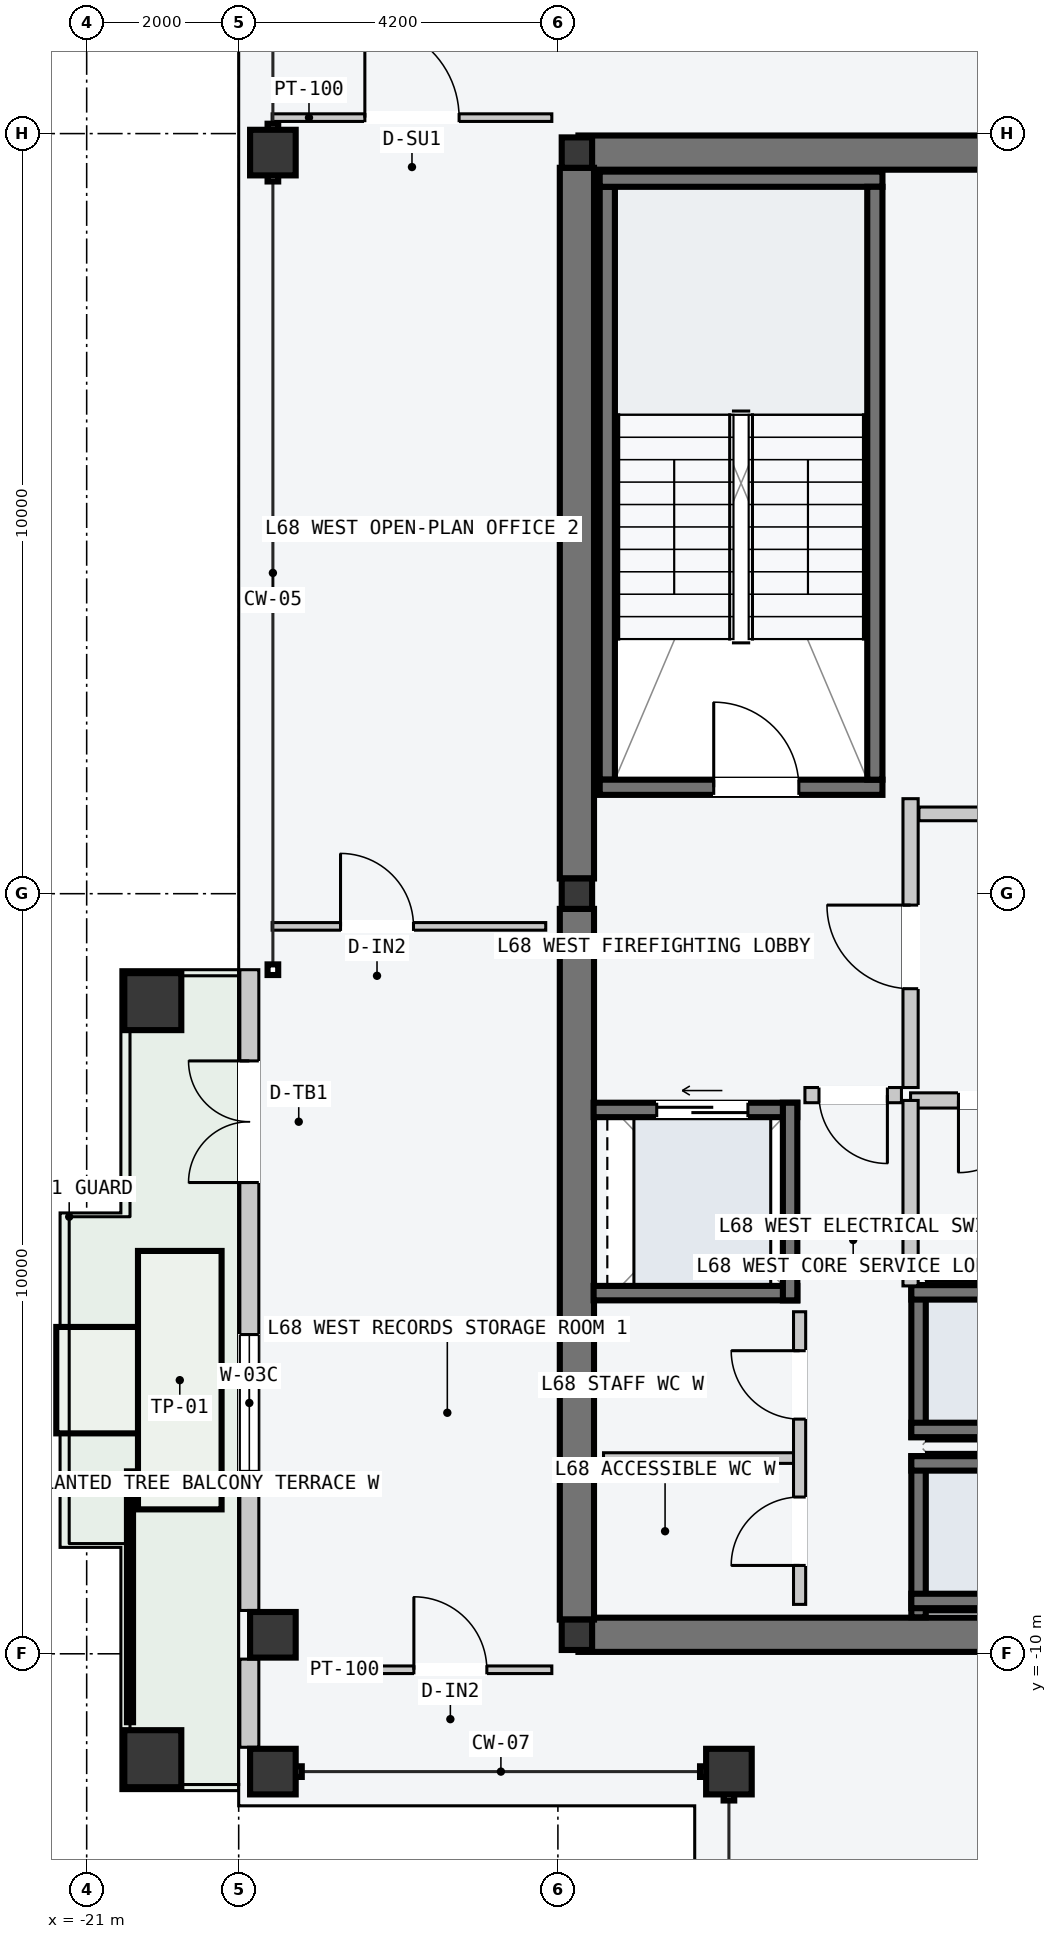
"""IFC4 building model, lengths in metres.
Left out: names, types, materials, properties, quantities, classifications, styles, units other than length and angle.
Written with IfcOpenShell. Run it as: python <this file> out.ifc"""

import sys

from ifc_helpers import new_model, si_unit, direction, frame, frame_2d, origin, origin_2d, place, context, subcontext, project, spatial, rectangle, hollow_rectangle, i_section, extrude, element, fill, save


model = new_model("IFC4")
c1 = context("Model", 3, precision=1e-05, world=origin(), true_north=direction((0.0, 1.0)))
c2 = subcontext(c1, "Body", "Model", "MODEL_VIEW")
j1 = project(units=[si_unit("LENGTHUNIT", "METRE"), si_unit("PLANEANGLEUNIT", "RADIAN")], contexts=[c1])
p1 = place(None, origin())
s1 = spatial("IfcSite", under=j1, at=p1, CompositionType="ELEMENT")
p2 = place(p1, origin())
s2 = spatial("IfcBuilding", under=s1, at=p2, CompositionType="ELEMENT")
p3 = place(p2, frame((0.0, 0.0, 258.0)))
s3 = spatial("IfcBuildingStorey", under=s2, at=p3, CompositionType="ELEMENT", Elevation=258.0)
for number, where, z_axis, x_axis in (
    (1, (-14.53, -9.75, -0.2), (0.0, 0.0, 1.0), (1.0, 0.0, 0.0)),
    (2, (-14.53, 9.75, -0.2), (0.0, 0.0, 1.0), (1.0, 0.0, 0.0)),
):
    element("IfcWall", number, at=place(p3, frame(where, z_axis=z_axis, x_axis=x_axis)), inside=s3, PredefinedType="SHEAR", context=c2, shape_type="SweptSolid", body=[
        extrude(rectangle(XDim=6.46, YDim=0.45, at=frame_2d((3.23, 0.0))), origin(), (0.0, 0.0, 1.0), 3.6),
    ])
for number, where, z_axis, x_axis in (
    (3, (-14.55, -9.55, -0.2), (0.0, 0.0, 1.0), (0.0, 1.0, 0.0)),
    (4, (-14.55, 0.2, -0.2), (0.0, 0.0, 1.0), (0.0, 1.0, 0.0)),
):
    element("IfcWall", number, at=place(p3, frame(where, z_axis=z_axis, x_axis=x_axis)), inside=s3, PredefinedType="SHEAR", context=c2, shape_type="SweptSolid", body=[
        extrude(rectangle(XDim=9.35, YDim=0.45, at=frame_2d((4.675, 0.0))), origin(), (0.0, 0.0, 1.0), 3.6),
    ])
p4 = place(p3, frame((-14.15, 1.5, -0.2), z_axis=(0.0, 0.0, 1.0), x_axis=(0.0, 1.0, 0.0)))
e5 = element("IfcWall", 5, at=p4, inside=s3, PredefinedType="SOLIDWALL", context=c2, shape_type="SweptSolid", body=[
    extrude(rectangle(XDim=7.8, YDim=0.2, at=frame_2d((3.9, 0.0))), origin(), (0.0, 0.0, 1.0), 3.6),
])
p5 = place(p3, frame((-14.25, 1.4, -0.2), z_axis=(0.0, 0.0, 1.0), x_axis=(1.0, 0.0, 0.0)))
e6 = element("IfcWall", 6, at=p5, inside=s3, PredefinedType="SOLIDWALL", context=c2, shape_type="SweptSolid", body=[
    extrude(rectangle(XDim=3.72, YDim=0.2, at=frame_2d((1.86, 0.0))), origin(), (0.0, 0.0, 1.0), 3.6),
])
p6 = place(p5, frame((1.5, 0.0, 0.2)))
e7 = element("IfcOpeningElement", 7, at=p6, cuts=e6, PredefinedType="OPENING", context=c2, shape_type="SweptSolid", body=[
    extrude(rectangle(XDim=1.12, YDim=2.18, at=frame_2d((0.56, 1.09))), frame((0.0, 0.11, 0.0), z_axis=(0.0, -1.0, 0.0), x_axis=(1.0, 0.0, 0.0)), (0.0, 0.0, 1.0), 0.22),
])
p7 = place(p3, frame((-14.25, 9.4, -0.2), z_axis=(0.0, 0.0, 1.0), x_axis=(1.0, 0.0, 0.0)))
e8 = element("IfcWall", 8, at=p7, inside=s3, PredefinedType="SOLIDWALL", context=c2, shape_type="SweptSolid", body=[
    extrude(rectangle(XDim=3.72, YDim=0.2, at=frame_2d((1.86, 0.0))), origin(), (0.0, 0.0, 1.0), 3.6),
])
p8 = place(p3, frame((-10.63, 1.5, -0.2), z_axis=(0.0, 0.0, 1.0), x_axis=(0.0, 1.0, 0.0)))
e9 = element("IfcWall", 9, at=p8, inside=s3, PredefinedType="SOLIDWALL", context=c2, shape_type="SweptSolid", body=[
    extrude(rectangle(XDim=7.8, YDim=0.2, at=frame_2d((3.9, 0.0))), origin(), (0.0, 0.0, 1.0), 3.6),
])
for number, where, z_axis, x_axis in (
    (10, (-14.55, -9.75, 0.0), (0.0, 0.0, 1.0), (1.0, 0.0, 0.0)),
    (11, (-14.55, 0.0, 0.0), (0.0, 0.0, 1.0), (1.0, 0.0, 0.0)),
    (12, (-14.55, 9.75, 0.0), (0.0, 0.0, 1.0), (1.0, 0.0, 0.0)),
):
    element("IfcColumn", number, at=place(p3, frame(where, z_axis=z_axis, x_axis=x_axis)), inside=s3, PredefinedType="COLUMN", context=c2, shape_type="SweptSolid", body=[
        extrude(i_section(OverallWidth=0.4, OverallDepth=0.4, WebThickness=0.013, FlangeThickness=0.021, at=origin_2d()), origin(), (0.0, 0.0, 1.0), 3.6),
    ])
for number, where, z_axis, x_axis in (
    (13, (-18.55, -11.55, 0.0), (0.0, 0.0, 1.0), (0.0, 1.0, 0.0)),
    (14, (-18.55, -9.75, 0.0), (0.0, 0.0, 1.0), (0.0, 1.0, 0.0)),
    (15, (-18.55, 9.75, 0.0), (0.0, 0.0, 1.0), (0.0, 1.0, 0.0)),
    (16, (-12.55, -11.55, 0.0), (0.0, 0.0, 1.0), (1.0, 0.0, 0.0)),
):
    element("IfcColumn", number, at=place(p3, frame(where, z_axis=z_axis, x_axis=x_axis)), inside=s3, PredefinedType="COLUMN", context=c2, shape_type="SweptSolid", body=[
        extrude(hollow_rectangle(XDim=0.6, YDim=0.6, WallThickness=0.025, at=origin_2d()), origin(), (0.0, 0.0, 1.0), 3.6),
    ])
for number, where, z_axis, x_axis in (
    (17, (-20.13, -11.38, 0.0), (0.0, 0.0, 1.0), (0.0, 1.0, 0.0)),
    (18, (-20.13, -1.42, 0.0), (0.0, 0.0, 1.0), (0.0, 1.0, 0.0)),
):
    element("IfcColumn", number, at=place(p3, frame(where, z_axis=z_axis, x_axis=x_axis)), inside=s3, PredefinedType="COLUMN", context=c2, shape_type="SweptSolid", body=[
        extrude(hollow_rectangle(XDim=0.75, YDim=0.75, WallThickness=0.032, at=origin_2d()), origin(), (0.0, 0.0, 1.0), 3.6),
    ])
p9 = place(p3, frame((-18.86, -11.23, 0.0), z_axis=(0.0, 0.0, 1.0), x_axis=(0.0, 1.0, 0.0)))
e19 = element("IfcWall", 19, at=p9, inside=s3, PredefinedType="STANDARD", context=c2, shape_type="SweptSolid", body=[
    extrude(rectangle(XDim=1.16, YDim=0.25, at=frame_2d((0.58, 0.0))), origin(), (0.0, 0.0, 1.0), 3.4),
])
p10 = place(p3, frame((-18.86, -9.43, 0.0), z_axis=(0.0, 0.0, 1.0), x_axis=(0.0, 1.0, 0.0)))
e20 = element("IfcWall", 20, at=p10, inside=s3, PredefinedType="STANDARD", context=c2, shape_type="SweptSolid", body=[
    extrude(rectangle(XDim=8.43, YDim=0.25, at=frame_2d((4.215, 0.0))), origin(), (0.0, 0.0, 1.0), 3.4),
])
p11 = place(p10, frame((5.63, 0.0, 0.0)))
e21 = element("IfcOpeningElement", 21, at=p11, cuts=e20, PredefinedType="OPENING", context=c2, shape_type="SweptSolid", body=[
    extrude(rectangle(XDim=1.6, YDim=2.2, at=frame_2d((0.8, 1.1))), frame((0.0, 0.135, 0.0), z_axis=(0.0, -1.0, 0.0), x_axis=(1.0, 0.0, 0.0)), (0.0, 0.0, 1.0), 0.27),
])
p12 = place(p10, frame((1.83, 0.0, 0.85)))
e22 = element("IfcOpeningElement", 22, at=p12, cuts=e20, PredefinedType="OPENING", context=c2, shape_type="SweptSolid", body=[
    extrude(rectangle(XDim=1.8, YDim=2.05, at=frame_2d((0.9, 1.025))), frame((0.0, 0.135, 0.0), z_axis=(0.0, -1.0, 0.0), x_axis=(1.0, 0.0, 0.0)), (0.0, 0.0, 1.0), 0.27),
])
p13 = place(p3, frame((-10.055, -9.52, -0.2), z_axis=(0.0, 0.0, 1.0), x_axis=(0.0, 1.0, 0.0)))
e23 = element("IfcWall", 23, at=p13, inside=s3, PredefinedType="SOLIDWALL", context=c2, shape_type="SweptSolid", body=[
    extrude(rectangle(XDim=2.12, YDim=0.19, at=frame_2d((1.06, 0.0))), origin(), (0.0, 0.0, 1.0), 3.6),
])
for number, where, z_axis, x_axis in (
    (24, (-10.15, -7.495, -0.2), (0.0, 0.0, 1.0), (1.0, 0.0, 0.0)),
    (25, (-10.15, -9.305, -0.2), (0.0, 0.0, 1.0), (1.0, 0.0, 0.0)),
):
    element("IfcWall", number, at=place(p3, frame(where, z_axis=z_axis, x_axis=x_axis)), inside=s3, PredefinedType="SOLIDWALL", context=c2, shape_type="SweptSolid", body=[
        extrude(rectangle(XDim=2.2, YDim=0.19, at=frame_2d((1.1, 0.0))), origin(), (0.0, 0.0, 1.0), 3.6),
    ])
p14 = place(p3, frame((-10.055, -7.15, -0.2), z_axis=(0.0, 0.0, 1.0), x_axis=(0.0, 1.0, 0.0)))
e26 = element("IfcWall", 26, at=p14, inside=s3, PredefinedType="SOLIDWALL", context=c2, shape_type="SweptSolid", body=[
    extrude(rectangle(XDim=2.0, YDim=0.19, at=frame_2d((1.0, 0.0))), origin(), (0.0, 0.0, 1.0), 3.6),
])
for number, where, z_axis, x_axis in (
    (27, (-10.15, -5.245, -0.2), (0.0, 0.0, 1.0), (1.0, 0.0, 0.0)),
    (28, (-10.15, -7.055, -0.2), (0.0, 0.0, 1.0), (1.0, 0.0, 0.0)),
):
    element("IfcWall", number, at=place(p3, frame(where, z_axis=z_axis, x_axis=x_axis)), inside=s3, PredefinedType="SOLIDWALL", context=c2, shape_type="SweptSolid", body=[
        extrude(rectangle(XDim=2.2, YDim=0.19, at=frame_2d((1.1, 0.0))), origin(), (0.0, 0.0, 1.0), 3.6),
    ])
p15 = place(p3, frame((-14.33, -2.845, -0.2), z_axis=(0.0, 0.0, 1.0), x_axis=(1.0, 0.0, 0.0)))
e29 = element("IfcWall", 29, at=p15, inside=s3, PredefinedType="SOLIDWALL", context=c2, shape_type="SweptSolid", body=[
    extrude(rectangle(XDim=2.68, YDim=0.19, at=frame_2d((1.34, 0.0))), origin(), (0.0, 0.0, 1.0), 3.6),
])
p16 = place(p15, frame((0.83, 0.0, 0.2)))
e30 = element("IfcOpeningElement", 30, at=p16, cuts=e29, PredefinedType="OPENING", context=c2, shape_type="SweptSolid", body=[
    extrude(rectangle(XDim=1.2, YDim=2.2, at=frame_2d((0.6, 1.1))), frame((0.0, 0.105, 0.0), z_axis=(0.0, -1.0, 0.0), x_axis=(1.0, 0.0, 0.0)), (0.0, 0.0, 1.0), 0.21),
])
p17 = place(p3, frame((-14.33, -5.255, -0.2), z_axis=(0.0, 0.0, 1.0), x_axis=(1.0, 0.0, 0.0)))
e31 = element("IfcWall", 31, at=p17, inside=s3, PredefinedType="SOLIDWALL", context=c2, shape_type="SweptSolid", body=[
    extrude(rectangle(XDim=2.68, YDim=0.19, at=frame_2d((1.34, 0.0))), origin(), (0.0, 0.0, 1.0), 3.6),
])
p18 = place(p3, frame((-11.745, -5.35, -0.2), z_axis=(0.0, 0.0, 1.0), x_axis=(0.0, 1.0, 0.0)))
e32 = element("IfcWall", 32, at=p18, inside=s3, PredefinedType="SOLIDWALL", context=c2, shape_type="SweptSolid", body=[
    extrude(rectangle(XDim=2.6, YDim=0.19, at=frame_2d((1.3, 0.0))), origin(), (0.0, 0.0, 1.0), 3.6),
])
p19 = place(p3, frame((-10.16, -2.55, 0.0), z_axis=(0.0, 0.0, 1.0), x_axis=(0.0, 1.0, 0.0)))
e33 = element("IfcWall", 33, at=p19, inside=s3, PredefinedType="PARTITIONING", context=c2, shape_type="SweptSolid", body=[
    extrude(rectangle(XDim=3.8, YDim=0.2, at=frame_2d((1.9, 0.0))), origin(), (0.0, 0.0, 1.0), 3.4),
])
p20 = place(p19, frame((1.3, 0.0, 0.0)))
e34 = element("IfcOpeningElement", 34, at=p20, cuts=e33, PredefinedType="OPENING", context=c2, shape_type="SweptSolid", body=[
    extrude(rectangle(XDim=1.1, YDim=2.15, at=frame_2d((0.55, 1.075))), frame((0.0, 0.11, 0.0), z_axis=(0.0, -1.0, 0.0), x_axis=(1.0, 0.0, 0.0)), (0.0, 0.0, 1.0), 0.22),
])
p21 = place(p3, frame((-10.28, -2.65, 0.0), z_axis=(0.0, 0.0, 1.0), x_axis=(-1.0, 0.0, 0.0)))
e35 = element("IfcWall", 35, at=p21, inside=s3, PredefinedType="PARTITIONING", context=c2, shape_type="SweptSolid", body=[
    extrude(rectangle(XDim=1.27, YDim=0.2, at=frame_2d((0.635, 0.0))), origin(), (0.0, 0.0, 1.0), 3.4),
])
p22 = place(p21, frame((0.185, 0.0, 0.0)))
e36 = element("IfcOpeningElement", 36, at=p22, cuts=e35, PredefinedType="OPENING", context=c2, shape_type="SweptSolid", body=[
    extrude(rectangle(XDim=0.9, YDim=2.15, at=frame_2d((0.45, 1.075))), frame((0.0, 0.11, 0.0), z_axis=(0.0, -1.0, 0.0), x_axis=(1.0, 0.0, 0.0)), (0.0, 0.0, 1.0), 0.22),
])
p23 = place(p3, frame((-7.96, -2.72, 0.0), z_axis=(0.0, 0.0, 1.0), x_axis=(-1.0, 0.0, 0.0)))
e37 = element("IfcWall", 37, at=p23, inside=s3, PredefinedType="PARTITIONING", context=c2, shape_type="SweptSolid", body=[
    extrude(rectangle(XDim=2.2, YDim=0.2, at=frame_2d((1.1, 0.0))), origin(), (0.0, 0.0, 1.0), 3.4),
])
p24 = place(p23, frame((0.62, 0.0, 0.0)))
e38 = element("IfcOpeningElement", 38, at=p24, cuts=e37, PredefinedType="OPENING", context=c2, shape_type="SweptSolid", body=[
    extrude(rectangle(XDim=0.95, YDim=2.1, at=frame_2d((0.475, 1.05))), frame((0.0, 0.11, 0.0), z_axis=(0.0, -1.0, 0.0), x_axis=(1.0, 0.0, 0.0)), (0.0, 0.0, 1.0), 0.22),
])
p25 = place(p3, frame((-10.16, -5.16, 0.0), z_axis=(0.0, 0.0, 1.0), x_axis=(0.0, 1.0, 0.0)))
e39 = element("IfcWall", 39, at=p25, inside=s3, PredefinedType="PARTITIONING", context=c2, shape_type="SweptSolid", body=[
    extrude(rectangle(XDim=2.44, YDim=0.2, at=frame_2d((1.22, 0.0))), origin(), (0.0, 0.0, 1.0), 3.4),
])
p26 = place(p3, frame((-11.7, -7.425, 0.0), z_axis=(0.0, 0.0, 1.0), x_axis=(-1.0, 0.0, 0.0)))
e40 = element("IfcWall", 40, at=p26, inside=s3, PredefinedType="PARTITIONING", context=c2, shape_type="SweptSolid", body=[
    extrude(rectangle(XDim=2.5, YDim=0.14, at=frame_2d((1.25, 0.0))), origin(), (0.0, 0.0, 1.0), 3.4),
])
p27 = place(p3, frame((-11.62, -9.35, 0.0), z_axis=(0.0, 0.0, 1.0), x_axis=(0.0, 1.0, 0.0)))
e41 = element("IfcWall", 41, at=p27, inside=s3, PredefinedType="PARTITIONING", context=c2, shape_type="SweptSolid", body=[
    extrude(rectangle(XDim=3.85, YDim=0.16, at=frame_2d((1.925, 0.0))), origin(), (0.0, 0.0, 1.0), 3.4),
])
p28 = place(p27, frame((0.512, 0.0, 0.0)))
e42 = element("IfcOpeningElement", 42, at=p28, cuts=e41, PredefinedType="OPENING", context=c2, shape_type="SweptSolid", body=[
    extrude(rectangle(XDim=0.9, YDim=2.15, at=frame_2d((0.45, 1.075))), frame((0.0, 0.09, 0.0), z_axis=(0.0, -1.0, 0.0), x_axis=(1.0, 0.0, 0.0)), (0.0, 0.0, 1.0), 0.18),
])
p29 = place(p27, frame((2.438, 0.0, 0.0)))
e43 = element("IfcOpeningElement", 43, at=p29, cuts=e41, PredefinedType="OPENING", context=c2, shape_type="SweptSolid", body=[
    extrude(rectangle(XDim=0.9, YDim=2.15, at=frame_2d((0.45, 1.075))), frame((0.0, 0.09, 0.0), z_axis=(0.0, -1.0, 0.0), x_axis=(1.0, 0.0, 0.0)), (0.0, 0.0, 1.0), 0.18),
])
p30 = place(p3, frame((-10.05, 1.05, 0.0), z_axis=(0.0, 0.0, 1.0), x_axis=(1.0, 0.0, 0.0)))
e44 = element("IfcWall", 44, at=p30, inside=s3, PredefinedType="PARTITIONING", context=c2, shape_type="SweptSolid", body=[
    extrude(rectangle(XDim=8.79, YDim=0.18, at=frame_2d((4.395, 0.0))), origin(), (0.0, 0.0, 1.0), 3.4),
])
p31 = place(p3, frame((-18.56, 10.21, 0.0), z_axis=(0.0, 0.0, 1.0), x_axis=(1.0, 0.0, 0.0)))
e45 = element("IfcWall", 45, at=p31, inside=s3, PredefinedType="PARTITIONING", context=c2, shape_type="SweptSolid", body=[
    extrude(rectangle(XDim=3.68, YDim=0.1, at=frame_2d((1.84, 0.0))), origin(), (0.0, 0.0, 1.0), 3.4),
])
p32 = place(p31, frame((1.22, 0.0, 0.0)))
e46 = element("IfcOpeningElement", 46, at=p32, cuts=e45, PredefinedType="OPENING", context=c2, shape_type="SweptSolid", body=[
    extrude(rectangle(XDim=1.24, YDim=2.24, at=frame_2d((0.62, 1.12))), frame((0.0, 0.06, 0.0), z_axis=(0.0, -1.0, 0.0), x_axis=(1.0, 0.0, 0.0)), (0.0, 0.0, 1.0), 0.12),
])
p33 = place(p3, frame((-17.55, -10.21, 0.0), z_axis=(0.0, 0.0, 1.0), x_axis=(1.0, 0.0, 0.0)))
e47 = element("IfcWall", 47, at=p33, inside=s3, PredefinedType="PARTITIONING", context=c2, shape_type="SweptSolid", body=[
    extrude(rectangle(XDim=2.67, YDim=0.1, at=frame_2d((1.335, 0.0))), origin(), (0.0, 0.0, 1.0), 3.4),
])
p34 = place(p33, frame((0.855, 0.0, 0.0)))
e48 = element("IfcOpeningElement", 48, at=p34, cuts=e47, PredefinedType="OPENING", context=c2, shape_type="SweptSolid", body=[
    extrude(rectangle(XDim=0.96, YDim=2.18, at=frame_2d((0.48, 1.09))), frame((0.0, 0.06, 0.0), z_axis=(0.0, -1.0, 0.0), x_axis=(1.0, 0.0, 0.0)), (0.0, 0.0, 1.0), 0.12),
])
p35 = place(p3, frame((-18.56, -0.43, 0.0), z_axis=(0.0, 0.0, 1.0), x_axis=(1.0, 0.0, 0.0)))
e49 = element("IfcWall", 49, at=p35, inside=s3, PredefinedType="PARTITIONING", context=c2, shape_type="SweptSolid", body=[
    extrude(rectangle(XDim=3.6, YDim=0.1, at=frame_2d((1.8, 0.0))), origin(), (0.0, 0.0, 1.0), 3.4),
])
p36 = place(p35, frame((0.9, 0.0, 0.0)))
e50 = element("IfcOpeningElement", 50, at=p36, cuts=e49, PredefinedType="OPENING", context=c2, shape_type="SweptSolid", body=[
    extrude(rectangle(XDim=0.96, YDim=2.18, at=frame_2d((0.48, 1.09))), frame((0.0, 0.06, 0.0), z_axis=(0.0, -1.0, 0.0), x_axis=(1.0, 0.0, 0.0)), (0.0, 0.0, 1.0), 0.12),
])
p37 = place(p6, origin())
e51 = element("IfcDoor", 51, at=p37, inside=s3, OperationType="SINGLE_SWING_LEFT", PredefinedType="DOOR", context=c2, shape_type="SweptSolid", body=[
    extrude(rectangle(XDim=1.12, YDim=2.18, at=frame_2d((0.56, 1.09))), frame((0.0, 0.025, 0.0), z_axis=(0.0, -1.0, 0.0), x_axis=(1.0, 0.0, 0.0)), (0.0, 0.0, 1.0), 0.05),
])
fill(e7, e51)
p38 = place(p11, origin())
e52 = element("IfcDoor", 52, at=p38, inside=s3, OperationType="DOUBLE_DOOR_SINGLE_SWING", PredefinedType="DOOR", context=c2, shape_type="SweptSolid", body=[
    extrude(rectangle(XDim=1.6, YDim=2.2, at=frame_2d((0.8, 1.1))), frame((0.0, 0.025, 0.0), z_axis=(0.0, -1.0, 0.0), x_axis=(1.0, 0.0, 0.0)), (0.0, 0.0, 1.0), 0.05),
])
fill(e21, e52)
p39 = place(p12, origin())
e53 = element("IfcWindow", 53, at=p39, inside=s3, PartitioningType="SINGLE_PANEL", PredefinedType="WINDOW", context=c2, shape_type="SweptSolid", body=[
    extrude(rectangle(XDim=1.8, YDim=2.05, at=frame_2d((0.9, 1.025))), frame((0.0, 0.03, 0.0), z_axis=(0.0, -1.0, 0.0), x_axis=(1.0, 0.0, 0.0)), (0.0, 0.0, 1.0), 0.06),
])
fill(e22, e53)
p40 = place(p16, origin())
e54 = element("IfcDoor", 54, at=p40, inside=s3, OperationType="SLIDING_TO_LEFT", PredefinedType="DOOR", context=c2, shape_type="SweptSolid", body=[
    extrude(rectangle(XDim=1.2, YDim=2.2, at=frame_2d((0.6, 1.1))), frame((0.0, 0.025, 0.0), z_axis=(0.0, -1.0, 0.0), x_axis=(1.0, 0.0, 0.0)), (0.0, 0.0, 1.0), 0.05),
])
fill(e30, e54)
p41 = place(p20, origin())
e55 = element("IfcDoor", 55, at=p41, inside=s3, OperationType="SINGLE_SWING_RIGHT", PredefinedType="DOOR", context=c2, shape_type="SweptSolid", body=[
    extrude(rectangle(XDim=1.1, YDim=2.15, at=frame_2d((0.55, 1.075))), frame((0.0, 0.025, 0.0), z_axis=(0.0, -1.0, 0.0), x_axis=(1.0, 0.0, 0.0)), (0.0, 0.0, 1.0), 0.05),
])
fill(e34, e55)
p42 = place(p22, origin())
e56 = element("IfcDoor", 56, at=p42, inside=s3, OperationType="SINGLE_SWING_LEFT", PredefinedType="DOOR", context=c2, shape_type="SweptSolid", body=[
    extrude(rectangle(XDim=0.9, YDim=2.15, at=frame_2d((0.45, 1.075))), frame((0.0, 0.025, 0.0), z_axis=(0.0, -1.0, 0.0), x_axis=(1.0, 0.0, 0.0)), (0.0, 0.0, 1.0), 0.05),
])
fill(e36, e56)
p43 = place(p24, origin())
e57 = element("IfcDoor", 57, at=p43, inside=s3, OperationType="SINGLE_SWING_RIGHT", PredefinedType="DOOR", context=c2, shape_type="SweptSolid", body=[
    extrude(rectangle(XDim=0.95, YDim=2.1, at=frame_2d((0.475, 1.05))), frame((0.0, 0.025, 0.0), z_axis=(0.0, -1.0, 0.0), x_axis=(1.0, 0.0, 0.0)), (0.0, 0.0, 1.0), 0.05),
])
fill(e38, e57)
p44 = place(p28, origin())
e58 = element("IfcDoor", 58, at=p44, inside=s3, OperationType="SINGLE_SWING_LEFT", PredefinedType="DOOR", context=c2, shape_type="SweptSolid", body=[
    extrude(rectangle(XDim=0.9, YDim=2.15, at=frame_2d((0.45, 1.075))), frame((0.0, 0.025, 0.0), z_axis=(0.0, -1.0, 0.0), x_axis=(1.0, 0.0, 0.0)), (0.0, 0.0, 1.0), 0.05),
])
fill(e42, e58)
p45 = place(p29, origin())
e59 = element("IfcDoor", 59, at=p45, inside=s3, OperationType="SINGLE_SWING_RIGHT", PredefinedType="DOOR", context=c2, shape_type="SweptSolid", body=[
    extrude(rectangle(XDim=0.9, YDim=2.15, at=frame_2d((0.45, 1.075))), frame((0.0, 0.025, 0.0), z_axis=(0.0, -1.0, 0.0), x_axis=(1.0, 0.0, 0.0)), (0.0, 0.0, 1.0), 0.05),
])
fill(e43, e59)
p46 = place(p32, origin())
e60 = element("IfcDoor", 60, at=p46, inside=s3, OperationType="SINGLE_SWING_LEFT", PredefinedType="DOOR", context=c2, shape_type="SweptSolid", body=[
    extrude(rectangle(XDim=1.24, YDim=2.24, at=frame_2d((0.62, 1.12))), frame((0.0, 0.025, 0.0), z_axis=(0.0, -1.0, 0.0), x_axis=(1.0, 0.0, 0.0)), (0.0, 0.0, 1.0), 0.05),
])
fill(e46, e60)
p47 = place(p34, origin())
e61 = element("IfcDoor", 61, at=p47, inside=s3, OperationType="SINGLE_SWING_LEFT", PredefinedType="DOOR", context=c2, shape_type="SweptSolid", body=[
    extrude(rectangle(XDim=0.96, YDim=2.18, at=frame_2d((0.48, 1.09))), frame((0.0, 0.025, 0.0), z_axis=(0.0, -1.0, 0.0), x_axis=(1.0, 0.0, 0.0)), (0.0, 0.0, 1.0), 0.05),
])
fill(e48, e61)
p48 = place(p36, origin())
e62 = element("IfcDoor", 62, at=p48, inside=s3, OperationType="SINGLE_SWING_LEFT", PredefinedType="DOOR", context=c2, shape_type="SweptSolid", body=[
    extrude(rectangle(XDim=0.96, YDim=2.18, at=frame_2d((0.48, 1.09))), frame((0.0, 0.025, 0.0), z_axis=(0.0, -1.0, 0.0), x_axis=(1.0, 0.0, 0.0)), (0.0, 0.0, 1.0), 0.05),
])
fill(e50, e62)
save(model, sys.argv[1])
